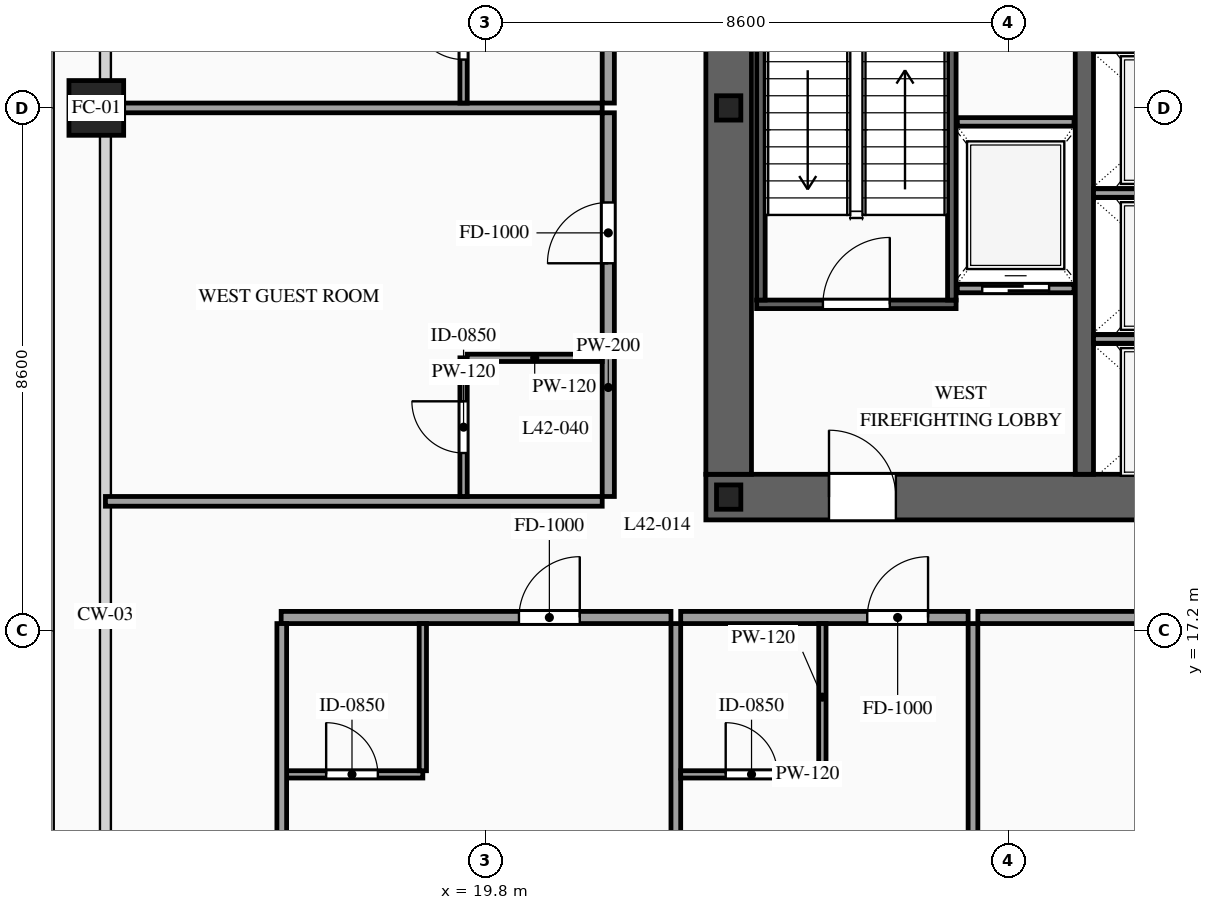
"""IFC4 building model, lengths in metres.
Left out: names, types, materials, properties, quantities, classifications, styles, units other than length and angle.
Written with IfcOpenShell. Run it as: python <this file> out.ifc"""

import sys

from ifc_helpers import new_model, si_unit, direction, frame, frame_2d, origin, origin_2d, place, context, subcontext, project, spatial, rectangle, hollow_rectangle, i_section, extrude, source, transform, mapped, element, fill, save


model = new_model("IFC4")
c1 = context("Model", 3, precision=1e-05, world=origin(), true_north=direction((0.0, 1.0)))
c2 = subcontext(c1, "Body", "Model", "MODEL_VIEW")
j1 = project(units=[si_unit("LENGTHUNIT", "METRE"), si_unit("PLANEANGLEUNIT", "RADIAN")], contexts=[c1])
p1 = place(None, origin())
s1 = spatial("IfcSite", under=j1, at=p1, CompositionType="ELEMENT")
p2 = place(p1, origin())
s2 = spatial("IfcBuilding", under=s1, at=p2, CompositionType="ELEMENT")
p3 = place(p2, frame((0.0, 0.0, 159.6)))
s3 = spatial("IfcBuildingStorey", under=s2, at=p3, CompositionType="ELEMENT", Elevation=159.6)
p4 = place(p3, frame((23.425, 19.4, 0.0), z_axis=(0.0, 0.0, 1.0), x_axis=(1.0, 0.0, 0.0)))
e1 = element("IfcWall", 1, at=p4, inside=s3, PredefinedType="SHEAR", context=c2, shape_type="SweptSolid", body=[
    extrude(rectangle(XDim=27.15, YDim=0.75, at=frame_2d((13.575, 0.0))), origin(), (0.0, 0.0, 1.0), 3.6),
])
p5 = place(p4, frame((2.025, 0.0, 0.0)))
e2 = element("IfcOpeningElement", 2, at=p5, cuts=e1, PredefinedType="OPENING", context=c2, shape_type="SweptSolid", body=[
    extrude(rectangle(XDim=1.1, YDim=2.2, at=frame_2d((0.55, 1.1))), frame((0.0, 0.39, 0.0), z_axis=(0.0, -1.0, 0.0), x_axis=(1.0, 0.0, 0.0)), (0.0, 0.0, 1.0), 0.78),
])
p6 = place(p4, frame((9.925, 0.0, 0.0)))
e3 = element("IfcOpeningElement", 3, at=p6, cuts=e1, PredefinedType="OPENING", context=c2, shape_type="SweptSolid", body=[
    extrude(rectangle(XDim=1.1, YDim=2.2, at=frame_2d((0.55, 1.1))), frame((0.0, 0.39, 0.0), z_axis=(0.0, -1.0, 0.0), x_axis=(1.0, 0.0, 0.0)), (0.0, 0.0, 1.0), 0.78),
])
p7 = place(p4, frame((23.125, 0.0, 0.0)))
e4 = element("IfcOpeningElement", 4, at=p7, cuts=e1, PredefinedType="OPENING", context=c2, shape_type="SweptSolid", body=[
    extrude(rectangle(XDim=1.1, YDim=2.2, at=frame_2d((0.55, 1.1))), frame((0.0, 0.39, 0.0), z_axis=(0.0, -1.0, 0.0), x_axis=(1.0, 0.0, 0.0)), (0.0, 0.0, 1.0), 0.78),
])
p8 = place(p4, frame((19.745, 0.0, 0.0)))
e5 = element("IfcOpeningElement", 5, at=p8, cuts=e1, PredefinedType="OPENING", context=c2, shape_type="SweptSolid", body=[
    extrude(rectangle(XDim=0.9, YDim=2.15, at=frame_2d((0.45, 1.075))), frame((0.0, 0.39, 0.0), z_axis=(0.0, -1.0, 0.0), x_axis=(1.0, 0.0, 0.0)), (0.0, 0.0, 1.0), 0.78),
])
p9 = place(p4, frame((18.305, 0.0, 0.0)))
e6 = element("IfcOpeningElement", 6, at=p9, cuts=e1, PredefinedType="OPENING", context=c2, shape_type="SweptSolid", body=[
    extrude(rectangle(XDim=0.9, YDim=2.15, at=frame_2d((0.45, 1.075))), frame((0.0, 0.39, 0.0), z_axis=(0.0, -1.0, 0.0), x_axis=(1.0, 0.0, 0.0)), (0.0, 0.0, 1.0), 0.78),
])
m1 = source(origin(), c2, "Body", "SweptSolid", [
    extrude(rectangle(XDim=12.05, YDim=0.75, at=frame_2d((6.025, 0.0))), origin(), (0.0, 0.0, 1.0), 3.6),
])
p10 = place(p3, frame((23.8, 19.775, 0.0), z_axis=(0.0, 0.0, 1.0), x_axis=(0.0, 1.0, 0.0)))
e7 = element("IfcWall", 7, at=p10, inside=s3, PredefinedType="SHEAR", context=c2, shape_type="MappedRepresentation", body=[
    mapped(m1, transform((0.0, 0.0, 0.0), scale=1.0)),
])
m2 = source(origin(), c2, "Body", "SweptSolid", [
    extrude(rectangle(XDim=12.05, YDim=0.3, at=frame_2d((6.025, 0.0))), origin(), (0.0, 0.0, 1.0), 3.6),
])
p11 = place(p3, frame((29.65, 19.775, 0.0), z_axis=(0.0, 0.0, 1.0), x_axis=(0.0, 1.0, 0.0)))
e8 = element("IfcWall", 8, at=p11, inside=s3, PredefinedType="SOLIDWALL", context=c2, shape_type="MappedRepresentation", body=[
    mapped(m2, transform((0.0, 0.0, 0.0), scale=1.0)),
])
m3 = source(origin(), c2, "Body", "SweptSolid", [
    extrude(i_section(OverallWidth=0.4, OverallDepth=0.4, WebThickness=0.013, FlangeThickness=0.021, at=origin_2d()), origin(), (0.0, 0.0, 1.0), 3.6),
])
for number, where, z_axis, x_axis in (
    (9, (23.8, 19.4, 0.0), (0.0, 0.0, 1.0), (1.0, 0.0, 0.0)),
    (10, (23.8, 25.8, 0.0), (0.0, 0.0, 1.0), (1.0, 0.0, 0.0)),
):
    element("IfcColumn", number, at=place(p3, frame(where, z_axis=z_axis, x_axis=x_axis)), inside=s3, PredefinedType="COLUMN", context=c2, shape_type="MappedRepresentation", body=[
        mapped(m3, transform((0.0, 0.0, 0.0), scale=1.0)),
    ])
m4 = source(origin(), c2, "Body", "SweptSolid", [
    extrude(hollow_rectangle(XDim=0.9, YDim=0.9, WallThickness=0.042, at=origin_2d()), origin(), (0.0, 0.0, 1.0), 3.6),
])
p12 = place(p3, frame((13.4, 25.8, 0.0), z_axis=(0.0, 0.0, 1.0), x_axis=(1.0, 0.0, 0.0)))
e11 = element("IfcColumn", 11, at=p12, inside=s3, PredefinedType="COLUMN", context=c2, shape_type="MappedRepresentation", body=[
    mapped(m4, transform((0.0, 0.0, 0.0), scale=1.0)),
])
p13 = place(p3, frame((27.56, 22.83, 0.0), z_axis=(0.0, 0.0, 1.0), x_axis=(1.0, 0.0, 0.0)))
e12 = element("IfcWall", 12, at=p13, inside=s3, PredefinedType="SOLIDWALL", context=c2, shape_type="SweptSolid", body=[
    extrude(rectangle(XDim=1.92, YDim=0.14, at=frame_2d((0.96, 0.0))), origin(), (0.0, 0.0, 1.0), 3.38),
])
p14 = place(p13, frame((0.41, 0.0, 0.0)))
e13 = element("IfcOpeningElement", 13, at=p14, cuts=e12, PredefinedType="OPENING", context=c2, shape_type="SweptSolid", body=[
    extrude(rectangle(XDim=1.1, YDim=2.2, at=frame_2d((0.55, 1.1))), frame((0.0, 0.085, 0.0), z_axis=(0.0, -1.0, 0.0), x_axis=(1.0, 0.0, 0.0)), (0.0, 0.0, 1.0), 0.17),
])
m5 = source(origin(), c2, "Body", "SweptSolid", [
    extrude(rectangle(XDim=1.92, YDim=0.14, at=frame_2d((0.96, 0.0))), origin(), (0.0, 0.0, 1.0), 3.38),
])
p15 = place(p3, frame((27.56, 25.57, 0.0), z_axis=(0.0, 0.0, 1.0), x_axis=(1.0, 0.0, 0.0)))
e14 = element("IfcWall", 14, at=p15, inside=s3, PredefinedType="SOLIDWALL", context=c2, shape_type="MappedRepresentation", body=[
    mapped(m5, transform((0.0, 0.0, 0.0), scale=1.0)),
])
m6 = source(origin(), c2, "Body", "SweptSolid", [
    extrude(rectangle(XDim=2.5, YDim=0.14, at=frame_2d((1.25, 0.0))), origin(), (0.0, 0.0, 1.0), 3.38),
])
for number, where, z_axis, x_axis in (
    (15, (29.8, 22.0, 0.0), (0.0, 0.0, 1.0), (1.0, 0.0, 0.0)),
    (16, (29.8, 24.4, 0.0), (0.0, 0.0, 1.0), (1.0, 0.0, 0.0)),
):
    element("IfcWall", number, at=place(p3, frame(where, z_axis=z_axis, x_axis=x_axis)), inside=s3, PredefinedType="SOLIDWALL", context=c2, shape_type="MappedRepresentation", body=[
        mapped(m6, transform((0.0, 0.0, 0.0), scale=1.0)),
    ])
p16 = place(p3, frame((24.26, 22.57, 0.0), z_axis=(0.0, 0.0, 1.0), x_axis=(1.0, 0.0, 0.0)))
e17 = element("IfcWall", 17, at=p16, inside=s3, PredefinedType="SOLIDWALL", context=c2, shape_type="SweptSolid", body=[
    extrude(rectangle(XDim=3.28, YDim=0.14, at=frame_2d((1.64, 0.0))), origin(), (0.0, 0.0, 1.0), 3.38),
])
p17 = place(p16, frame((1.09, 0.0, 0.0)))
e18 = element("IfcOpeningElement", 18, at=p17, cuts=e17, PredefinedType="OPENING", context=c2, shape_type="SweptSolid", body=[
    extrude(rectangle(XDim=1.1, YDim=2.2, at=frame_2d((0.55, 1.1))), frame((0.0, 0.085, 0.0), z_axis=(0.0, -1.0, 0.0), x_axis=(1.0, 0.0, 0.0)), (0.0, 0.0, 1.0), 0.17),
])
m7 = source(origin(), c2, "Body", "SweptSolid", [
    extrude(rectangle(XDim=8.94, YDim=0.14, at=frame_2d((4.47, 0.0))), origin(), (0.0, 0.0, 1.0), 3.38),
])
for number, where, z_axis, x_axis in (
    (19, (24.33, 22.64, 0.0), (0.0, 0.0, 1.0), (0.0, 1.0, 0.0)),
    (20, (27.47, 22.64, 0.0), (0.0, 0.0, 1.0), (0.0, 1.0, 0.0)),
):
    element("IfcWall", number, at=place(p3, frame(where, z_axis=z_axis, x_axis=x_axis)), inside=s3, PredefinedType="SOLIDWALL", context=c2, shape_type="MappedRepresentation", body=[
        mapped(m7, transform((0.0, 0.0, 0.0), scale=1.0)),
    ])
p18 = place(p3, frame((16.44, 17.42, 0.0), z_axis=(0.0, 0.0, 1.0), x_axis=(1.0, 0.0, 0.0)))
e21 = element("IfcWall", 21, at=p18, inside=s3, PredefinedType="PARTITIONING", context=c2, shape_type="SweptSolid", body=[
    extrude(rectangle(XDim=6.411, YDim=0.2, at=frame_2d((3.206, 0.0))), origin(), (0.0, 0.0, 1.0), 3.38),
])
p19 = place(p18, frame((3.911, 0.0, 0.0)))
e22 = element("IfcOpeningElement", 22, at=p19, cuts=e21, PredefinedType="OPENING", context=c2, shape_type="SweptSolid", body=[
    extrude(rectangle(XDim=1.0, YDim=2.2, at=frame_2d((0.5, 1.1))), frame((0.0, 0.115, 0.0), z_axis=(0.0, -1.0, 0.0), x_axis=(1.0, 0.0, 0.0)), (0.0, 0.0, 1.0), 0.23),
])
m8 = source(origin(), c2, "Body", "SweptSolid", [
    extrude(rectangle(XDim=14.97, YDim=0.16, at=frame_2d((7.485, 0.0))), origin(), (0.0, 0.0, 1.0), 3.38),
])
p20 = place(p3, frame((22.931, 2.35, 0.0), z_axis=(0.0, 0.0, 1.0), x_axis=(0.0, 1.0, 0.0)))
e23 = element("IfcWall", 23, at=p20, inside=s3, PredefinedType="PARTITIONING", context=c2, shape_type="MappedRepresentation", body=[
    mapped(m8, transform((0.0, 0.0, 0.0), scale=1.0)),
])
p21 = place(p3, frame((16.44, 14.84, 0.0), z_axis=(0.0, 0.0, 1.0), x_axis=(1.0, 0.0, 0.0)))
e24 = element("IfcWall", 24, at=p21, inside=s3, PredefinedType="PARTITIONING", context=c2, shape_type="SweptSolid", body=[
    extrude(rectangle(XDim=2.33, YDim=0.12, at=frame_2d((1.165, 0.0))), origin(), (0.0, 0.0, 1.0), 3.38),
])
p22 = place(p21, frame((0.74, 0.0, 0.0)))
e25 = element("IfcOpeningElement", 25, at=p22, cuts=e24, PredefinedType="OPENING", context=c2, shape_type="SweptSolid", body=[
    extrude(rectangle(XDim=0.85, YDim=2.1, at=frame_2d((0.425, 1.05))), frame((0.0, 0.075, 0.0), z_axis=(0.0, -1.0, 0.0), x_axis=(1.0, 0.0, 0.0)), (0.0, 0.0, 1.0), 0.15),
])
m9 = source(origin(), c2, "Body", "SweptSolid", [
    extrude(rectangle(XDim=2.42, YDim=0.12, at=frame_2d((1.21, 0.0))), origin(), (0.0, 0.0, 1.0), 3.38),
])
p23 = place(p3, frame((18.77, 14.9, 0.0), z_axis=(0.0, 0.0, 1.0), x_axis=(0.0, 1.0, 0.0)))
e26 = element("IfcWall", 26, at=p23, inside=s3, PredefinedType="PARTITIONING", context=c2, shape_type="MappedRepresentation", body=[
    mapped(m9, transform((0.0, 0.0, 0.0), scale=1.0)),
])
p24 = place(p3, frame((23.011, 17.42, 0.0), z_axis=(0.0, 0.0, 1.0), x_axis=(1.0, 0.0, 0.0)))
e27 = element("IfcWall", 27, at=p24, inside=s3, PredefinedType="PARTITIONING", context=c2, shape_type="SweptSolid", body=[
    extrude(rectangle(XDim=4.727, YDim=0.2, at=frame_2d((2.364, 0.0))), origin(), (0.0, 0.0, 1.0), 3.38),
])
p25 = place(p24, frame((3.068, 0.0, 0.0)))
e28 = element("IfcOpeningElement", 28, at=p25, cuts=e27, PredefinedType="OPENING", context=c2, shape_type="SweptSolid", body=[
    extrude(rectangle(XDim=1.0, YDim=2.2, at=frame_2d((0.5, 1.1))), frame((0.0, 0.115, 0.0), z_axis=(0.0, -1.0, 0.0), x_axis=(1.0, 0.0, 0.0)), (0.0, 0.0, 1.0), 0.23),
])
p26 = place(p3, frame((27.818, 2.35, 0.0), z_axis=(0.0, 0.0, 1.0), x_axis=(0.0, 1.0, 0.0)))
e29 = element("IfcWall", 29, at=p26, inside=s3, PredefinedType="PARTITIONING", context=c2, shape_type="MappedRepresentation", body=[
    mapped(m8, transform((0.0, 0.0, 0.0), scale=1.0)),
])
p27 = place(p3, frame((23.011, 14.84, 0.0), z_axis=(0.0, 0.0, 1.0), x_axis=(1.0, 0.0, 0.0)))
e30 = element("IfcWall", 30, at=p27, inside=s3, PredefinedType="PARTITIONING", context=c2, shape_type="SweptSolid", body=[
    extrude(rectangle(XDim=2.33, YDim=0.12, at=frame_2d((1.165, 0.0))), origin(), (0.0, 0.0, 1.0), 3.38),
])
p28 = place(p27, frame((0.74, 0.0, 0.0)))
e31 = element("IfcOpeningElement", 31, at=p28, cuts=e30, PredefinedType="OPENING", context=c2, shape_type="SweptSolid", body=[
    extrude(rectangle(XDim=0.85, YDim=2.1, at=frame_2d((0.425, 1.05))), frame((0.0, 0.075, 0.0), z_axis=(0.0, -1.0, 0.0), x_axis=(1.0, 0.0, 0.0)), (0.0, 0.0, 1.0), 0.15),
])
p29 = place(p3, frame((25.341, 14.9, 0.0), z_axis=(0.0, 0.0, 1.0), x_axis=(0.0, 1.0, 0.0)))
e32 = element("IfcWall", 32, at=p29, inside=s3, PredefinedType="PARTITIONING", context=c2, shape_type="MappedRepresentation", body=[
    mapped(m9, transform((0.0, 0.0, 0.0), scale=1.0)),
])
p30 = place(p3, frame((27.898, 17.42, 0.0), z_axis=(0.0, 0.0, 1.0), x_axis=(1.0, 0.0, 0.0)))
e33 = element("IfcWall", 33, at=p30, inside=s3, PredefinedType="PARTITIONING", context=c2, shape_type="SweptSolid", body=[
    extrude(rectangle(XDim=6.702, YDim=0.2, at=frame_2d((3.351, 0.0))), origin(), (0.0, 0.0, 1.0), 3.38),
])
p31 = place(p30, frame((2.851, 0.0, 0.0)))
e34 = element("IfcOpeningElement", 34, at=p31, cuts=e33, PredefinedType="OPENING", context=c2, shape_type="SweptSolid", body=[
    extrude(rectangle(XDim=1.0, YDim=2.2, at=frame_2d((0.5, 1.1))), frame((0.0, 0.115, 0.0), z_axis=(0.0, -1.0, 0.0), x_axis=(1.0, 0.0, 0.0)), (0.0, 0.0, 1.0), 0.23),
])
m10 = source(origin(), c2, "Body", "SweptSolid", [
    extrude(rectangle(XDim=14.82, YDim=0.16, at=frame_2d((7.41, 0.0))), origin(), (0.0, 0.0, 1.0), 3.38),
])
p32 = place(p3, frame((16.45, 2.5, 0.0), z_axis=(0.0, 0.0, 1.0), x_axis=(0.0, 1.0, 0.0)))
e35 = element("IfcWall", 35, at=p32, inside=s3, PredefinedType="PARTITIONING", context=c2, shape_type="MappedRepresentation", body=[
    mapped(m10, transform((0.0, 0.0, 0.0), scale=1.0)),
])
p33 = place(p3, frame((21.82, 19.41, 0.0), z_axis=(0.0, 0.0, 1.0), x_axis=(0.0, 1.0, 0.0)))
e36 = element("IfcWall", 36, at=p33, inside=s3, PredefinedType="PARTITIONING", context=c2, shape_type="SweptSolid", body=[
    extrude(rectangle(XDim=6.31, YDim=0.2, at=frame_2d((3.155, 0.0))), origin(), (0.0, 0.0, 1.0), 3.38),
])
p34 = place(p33, frame((3.835, 0.0, 0.0)))
e37 = element("IfcOpeningElement", 37, at=p34, cuts=e36, PredefinedType="OPENING", context=c2, shape_type="SweptSolid", body=[
    extrude(rectangle(XDim=1.0, YDim=2.2, at=frame_2d((0.5, 1.1))), frame((0.0, 0.115, 0.0), z_axis=(0.0, -1.0, 0.0), x_axis=(1.0, 0.0, 0.0)), (0.0, 0.0, 1.0), 0.23),
])
m11 = source(origin(), c2, "Body", "SweptSolid", [
    extrude(rectangle(XDim=8.17, YDim=0.16, at=frame_2d((4.085, 0.0))), origin(), (0.0, 0.0, 1.0), 2.675),
])
p35 = place(p3, frame((13.55, 25.8, 0.0), z_axis=(0.0, 0.0, 1.0), x_axis=(1.0, 0.0, 0.0)))
e38 = element("IfcWall", 38, at=p35, inside=s3, PredefinedType="PARTITIONING", context=c2, shape_type="MappedRepresentation", body=[
    mapped(m11, transform((0.0, 0.0, 0.0), scale=1.0)),
])
m12 = source(origin(), c2, "Body", "SweptSolid", [
    extrude(rectangle(XDim=8.17, YDim=0.16, at=frame_2d((4.085, 0.0))), origin(), (0.0, 0.0, 1.0), 2.875),
])
p36 = place(p3, frame((13.55, 19.33, 0.0), z_axis=(0.0, 0.0, 1.0), x_axis=(1.0, 0.0, 0.0)))
e39 = element("IfcWall", 39, at=p36, inside=s3, PredefinedType="PARTITIONING", context=c2, shape_type="MappedRepresentation", body=[
    mapped(m12, transform((0.0, 0.0, 0.0), scale=1.0)),
])
p37 = place(p3, frame((19.44, 19.41, 0.0), z_axis=(0.0, 0.0, 1.0), x_axis=(0.0, 1.0, 0.0)))
e40 = element("IfcWall", 40, at=p37, inside=s3, PredefinedType="PARTITIONING", context=c2, shape_type="SweptSolid", body=[
    extrude(rectangle(XDim=2.28, YDim=0.12, at=frame_2d((1.14, 0.0))), origin(), (0.0, 0.0, 1.0), 3.38),
])
p38 = place(p37, frame((0.715, 0.0, 0.0)))
e41 = element("IfcOpeningElement", 41, at=p38, cuts=e40, PredefinedType="OPENING", context=c2, shape_type="SweptSolid", body=[
    extrude(rectangle(XDim=0.85, YDim=2.1, at=frame_2d((0.425, 1.05))), frame((0.0, 0.075, 0.0), z_axis=(0.0, -1.0, 0.0), x_axis=(1.0, 0.0, 0.0)), (0.0, 0.0, 1.0), 0.15),
])
m13 = source(origin(), c2, "Body", "SweptSolid", [
    extrude(rectangle(XDim=2.22, YDim=0.12, at=frame_2d((1.11, 0.0))), origin(), (0.0, 0.0, 1.0), 3.38),
])
p39 = place(p3, frame((19.5, 21.69, 0.0), z_axis=(0.0, 0.0, 1.0), x_axis=(1.0, 0.0, 0.0)))
e42 = element("IfcWall", 42, at=p39, inside=s3, PredefinedType="PARTITIONING", context=c2, shape_type="MappedRepresentation", body=[
    mapped(m13, transform((0.0, 0.0, 0.0), scale=1.0)),
])
p40 = place(p3, frame((21.82, 25.88, 0.0), z_axis=(0.0, 0.0, 1.0), x_axis=(0.0, 1.0, 0.0)))
e43 = element("IfcWall", 43, at=p40, inside=s3, PredefinedType="PARTITIONING", context=c2, shape_type="SweptSolid", body=[
    extrude(rectangle(XDim=6.31, YDim=0.2, at=frame_2d((3.155, 0.0))), origin(), (0.0, 0.0, 1.0), 3.38),
])
p41 = place(p40, frame((3.835, 0.0, 0.0)))
e44 = element("IfcOpeningElement", 44, at=p41, cuts=e43, PredefinedType="OPENING", context=c2, shape_type="SweptSolid", body=[
    extrude(rectangle(XDim=1.0, YDim=2.2, at=frame_2d((0.5, 1.1))), frame((0.0, 0.115, 0.0), z_axis=(0.0, -1.0, 0.0), x_axis=(1.0, 0.0, 0.0)), (0.0, 0.0, 1.0), 0.23),
])
p42 = place(p3, frame((19.44, 25.88, 0.0), z_axis=(0.0, 0.0, 1.0), x_axis=(0.0, 1.0, 0.0)))
e45 = element("IfcWall", 45, at=p42, inside=s3, PredefinedType="PARTITIONING", context=c2, shape_type="SweptSolid", body=[
    extrude(rectangle(XDim=2.28, YDim=0.12, at=frame_2d((1.14, 0.0))), origin(), (0.0, 0.0, 1.0), 3.38),
])
p43 = place(p42, frame((0.715, 0.0, 0.0)))
e46 = element("IfcOpeningElement", 46, at=p43, cuts=e45, PredefinedType="OPENING", context=c2, shape_type="SweptSolid", body=[
    extrude(rectangle(XDim=0.85, YDim=2.1, at=frame_2d((0.425, 1.05))), frame((0.0, 0.075, 0.0), z_axis=(0.0, -1.0, 0.0), x_axis=(1.0, 0.0, 0.0)), (0.0, 0.0, 1.0), 0.15),
])
m14 = source(origin(), c2, "Body", "SweptSolid", [
    extrude(rectangle(XDim=1.1, YDim=2.2, at=frame_2d((0.55, 1.1))), frame((0.0, 0.025, 0.0), z_axis=(0.0, -1.0, 0.0), x_axis=(1.0, 0.0, 0.0)), (0.0, 0.0, 1.0), 0.05),
])
p44 = place(p14, origin())
e47 = element("IfcDoor", 47, at=p44, inside=s3, OperationType="SLIDING_TO_LEFT", PredefinedType="DOOR", context=c2, shape_type="MappedRepresentation", body=[
    mapped(m14, transform((0.0, 0.0, 0.0), scale=1.0)),
])
fill(e13, e47)
m15 = source(origin(), c2, "Body", "SweptSolid", [
    extrude(rectangle(XDim=1.1, YDim=2.2, at=frame_2d((0.55, 1.1))), frame((0.0, 0.025, 0.0), z_axis=(0.0, -1.0, 0.0), x_axis=(1.0, 0.0, 0.0)), (0.0, 0.0, 1.0), 0.05),
])
p45 = place(p17, origin())
e48 = element("IfcDoor", 48, at=p45, inside=s3, OperationType="SINGLE_SWING_RIGHT", PredefinedType="DOOR", context=c2, shape_type="MappedRepresentation", body=[
    mapped(m15, transform((0.0, 0.0, 0.0), scale=1.0)),
])
fill(e18, e48)
p46 = place(p5, origin())
e49 = element("IfcDoor", 49, at=p46, inside=s3, OperationType="SINGLE_SWING_LEFT", PredefinedType="DOOR", context=c2, shape_type="MappedRepresentation", body=[
    mapped(m15, transform((0.0, 0.0, 0.0), scale=1.0)),
])
fill(e2, e49)
m16 = source(origin(), c2, "Body", "SweptSolid", [
    extrude(rectangle(XDim=1.0, YDim=2.2, at=frame_2d((0.5, 1.1))), frame((0.0, 0.025, 0.0), z_axis=(0.0, -1.0, 0.0), x_axis=(1.0, 0.0, 0.0)), (0.0, 0.0, 1.0), 0.05),
])
p47 = place(p19, origin())
e50 = element("IfcDoor", 50, at=p47, inside=s3, OperationType="SINGLE_SWING_RIGHT", PredefinedType="DOOR", context=c2, shape_type="MappedRepresentation", body=[
    mapped(m16, transform((0.0, 0.0, 0.0), scale=1.0)),
])
fill(e22, e50)
m17 = source(origin(), c2, "Body", "SweptSolid", [
    extrude(rectangle(XDim=0.85, YDim=2.1, at=frame_2d((0.425, 1.05))), frame((0.0, 0.025, 0.0), z_axis=(0.0, -1.0, 0.0), x_axis=(1.0, 0.0, 0.0)), (0.0, 0.0, 1.0), 0.05),
])
p48 = place(p22, origin())
e51 = element("IfcDoor", 51, at=p48, inside=s3, OperationType="SINGLE_SWING_LEFT", PredefinedType="DOOR", context=c2, shape_type="MappedRepresentation", body=[
    mapped(m17, transform((0.0, 0.0, 0.0), scale=1.0)),
])
fill(e25, e51)
p49 = place(p25, origin())
e52 = element("IfcDoor", 52, at=p49, inside=s3, OperationType="SINGLE_SWING_RIGHT", PredefinedType="DOOR", context=c2, shape_type="MappedRepresentation", body=[
    mapped(m16, transform((0.0, 0.0, 0.0), scale=1.0)),
])
fill(e28, e52)
p50 = place(p28, origin())
e53 = element("IfcDoor", 53, at=p50, inside=s3, OperationType="SINGLE_SWING_LEFT", PredefinedType="DOOR", context=c2, shape_type="MappedRepresentation", body=[
    mapped(m17, transform((0.0, 0.0, 0.0), scale=1.0)),
])
fill(e31, e53)
p51 = place(p34, origin())
e54 = element("IfcDoor", 54, at=p51, inside=s3, OperationType="SINGLE_SWING_LEFT", PredefinedType="DOOR", context=c2, shape_type="MappedRepresentation", body=[
    mapped(m16, transform((0.0, 0.0, 0.0), scale=1.0)),
])
fill(e37, e54)
p52 = place(p38, origin())
e55 = element("IfcDoor", 55, at=p52, inside=s3, OperationType="SINGLE_SWING_RIGHT", PredefinedType="DOOR", context=c2, shape_type="MappedRepresentation", body=[
    mapped(m17, transform((0.0, 0.0, 0.0), scale=1.0)),
])
fill(e41, e55)
p53 = place(p43, origin())
e56 = element("IfcDoor", 56, at=p53, inside=s3, OperationType="SINGLE_SWING_RIGHT", PredefinedType="DOOR", context=c2, shape_type="MappedRepresentation", body=[
    mapped(m17, transform((0.0, 0.0, 0.0), scale=1.0)),
])
fill(e46, e56)
save(model, sys.argv[1])
